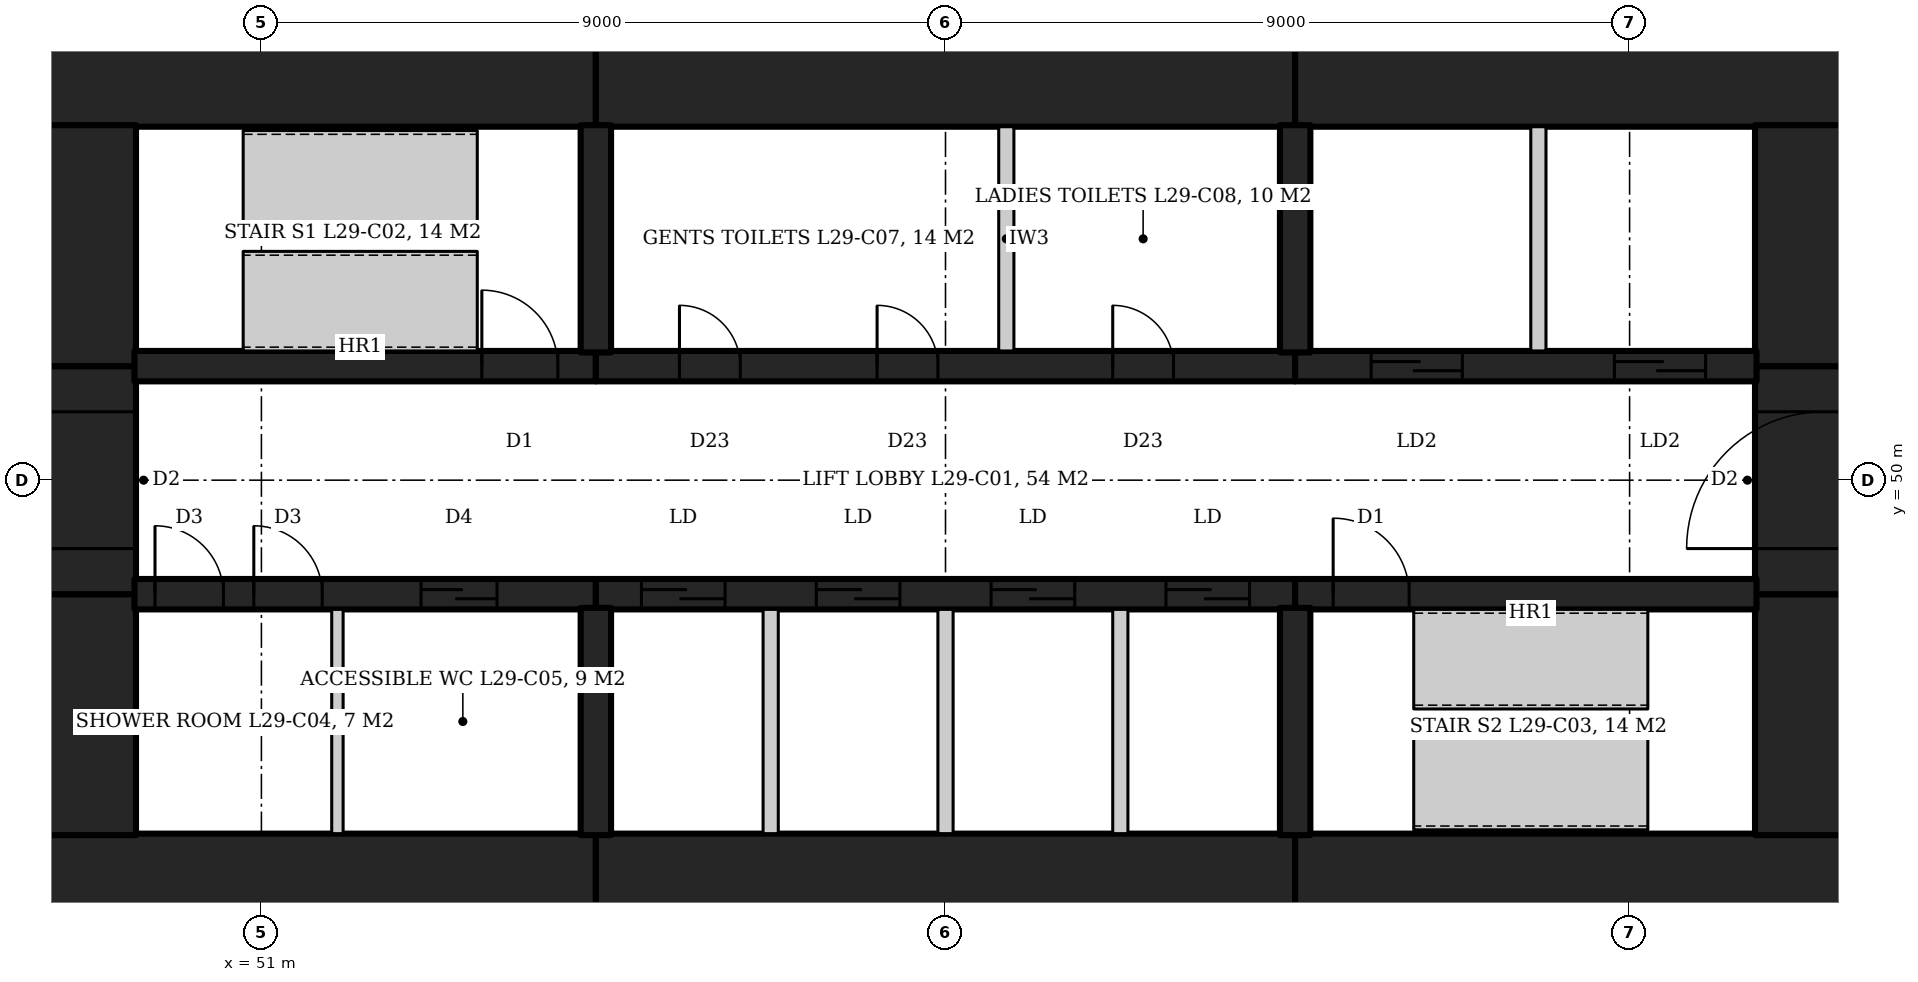
"""IFC4 building model, lengths in metres.
Left out: names, types, materials, properties, quantities, classifications, styles, units other than length and angle.
Written with IfcOpenShell. Run it as: python <this file> out.ifc"""

import sys

from ifc_helpers import new_model, si_unit, direction, frame, frame_2d, origin, place, context, subcontext, project, spatial, rectangle, extrude, element, fill, save


model = new_model("IFC4")
c1 = context("Model", 3, precision=1e-05, world=origin(), true_north=direction((0.0, 1.0)))
c2 = subcontext(c1, "Body", "Model", "MODEL_VIEW")
j1 = project(units=[si_unit("LENGTHUNIT", "METRE"), si_unit("PLANEANGLEUNIT", "RADIAN")], contexts=[c1])
p1 = place(None, origin())
s1 = spatial("IfcSite", under=j1, at=p1, CompositionType="ELEMENT")
p2 = place(p1, origin())
s2 = spatial("IfcBuilding", under=s1, at=p2, CompositionType="ELEMENT")
p3 = place(p2, frame((0.0, 0.0, 122.6)))
s3 = spatial("IfcBuildingStorey", under=s2, at=p3, CompositionType="ELEMENT", Elevation=122.6)
p4 = place(p3, frame((47.55, 55.55, 0.0), z_axis=(0.0, 0.0, 1.0), x_axis=(1.0, 0.0, 0.0)))
e1 = element("IfcWall", 1, at=p4, inside=s3, PredefinedType="SHEAR", context=c2, shape_type="SweptSolid", body=[
    extrude(rectangle(XDim=7.85, YDim=1.8, at=frame_2d((3.925, 0.0))), origin(), (0.0, 0.0, 1.0), 4.2),
])
p5 = place(p3, frame((55.4, 55.55, 0.0), z_axis=(0.0, 0.0, 1.0), x_axis=(1.0, 0.0, 0.0)))
e2 = element("IfcWall", 2, at=p5, inside=s3, PredefinedType="SHEAR", context=c2, shape_type="SweptSolid", body=[
    extrude(rectangle(XDim=9.2, YDim=1.8, at=frame_2d((4.6, 0.0))), origin(), (0.0, 0.0, 1.0), 4.2),
])
for number, where, z_axis, x_axis in (
    (3, (64.6, 55.55, 0.0), (0.0, 0.0, 1.0), (1.0, 0.0, 0.0)),
    (4, (47.55, 44.45, 0.0), (0.0, 0.0, 1.0), (1.0, 0.0, 0.0)),
):
    element("IfcWall", number, at=place(p3, frame(where, z_axis=z_axis, x_axis=x_axis)), inside=s3, PredefinedType="SHEAR", context=c2, shape_type="SweptSolid", body=[
        extrude(rectangle(XDim=7.85, YDim=1.8, at=frame_2d((3.925, 0.0))), origin(), (0.0, 0.0, 1.0), 4.2),
    ])
p6 = place(p3, frame((55.4, 44.45, 0.0), z_axis=(0.0, 0.0, 1.0), x_axis=(1.0, 0.0, 0.0)))
e5 = element("IfcWall", 5, at=p6, inside=s3, PredefinedType="SHEAR", context=c2, shape_type="SweptSolid", body=[
    extrude(rectangle(XDim=9.2, YDim=1.8, at=frame_2d((4.6, 0.0))), origin(), (0.0, 0.0, 1.0), 4.2),
])
p7 = place(p3, frame((64.6, 44.45, 0.0), z_axis=(0.0, 0.0, 1.0), x_axis=(1.0, 0.0, 0.0)))
e6 = element("IfcWall", 6, at=p7, inside=s3, PredefinedType="SHEAR", context=c2, shape_type="SweptSolid", body=[
    extrude(rectangle(XDim=7.85, YDim=1.8, at=frame_2d((3.925, 0.0))), origin(), (0.0, 0.0, 1.0), 4.2),
])
p8 = place(p3, frame((71.55, 45.33, 0.0), z_axis=(0.0, 0.0, 1.0), x_axis=(0.0, 1.0, 0.0)))
e7 = element("IfcWall", 7, at=p8, inside=s3, PredefinedType="SHEAR", context=c2, shape_type="SweptSolid", body=[
    extrude(rectangle(XDim=3.17, YDim=1.8, at=frame_2d((1.585, 0.0))), origin(), (0.0, 0.0, 1.0), 4.2),
])
p9 = place(p3, frame((71.55, 48.5, 0.0), z_axis=(0.0, 0.0, 1.0), x_axis=(0.0, 1.0, 0.0)))
e8 = element("IfcWall", 8, at=p9, inside=s3, PredefinedType="SHEAR", context=c2, shape_type="SweptSolid", body=[
    extrude(rectangle(XDim=3.0, YDim=1.8, at=frame_2d((1.5, 0.0))), origin(), (0.0, 0.0, 1.0), 4.2),
])
p10 = place(p9, frame((0.6, 0.0, 0.0)))
e9 = element("IfcOpeningElement", 9, at=p10, cuts=e8, PredefinedType="OPENING", context=c2, shape_type="SweptSolid", body=[
    extrude(rectangle(XDim=1.8, YDim=2.1, at=frame_2d((0.9, 1.05))), frame((0.0, 0.91, 0.0), z_axis=(0.0, -1.0, 0.0), x_axis=(1.0, 0.0, 0.0)), (0.0, 0.0, 1.0), 1.82),
])
for number, where, z_axis, x_axis in (
    (10, (71.55, 51.5, 0.0), (0.0, 0.0, 1.0), (0.0, 1.0, 0.0)),
    (11, (48.45, 45.33, 0.0), (0.0, 0.0, 1.0), (0.0, 1.0, 0.0)),
):
    element("IfcWall", number, at=place(p3, frame(where, z_axis=z_axis, x_axis=x_axis)), inside=s3, PredefinedType="SHEAR", context=c2, shape_type="SweptSolid", body=[
        extrude(rectangle(XDim=3.17, YDim=1.8, at=frame_2d((1.585, 0.0))), origin(), (0.0, 0.0, 1.0), 4.2),
    ])
p11 = place(p3, frame((48.45, 48.5, 0.0), z_axis=(0.0, 0.0, 1.0), x_axis=(0.0, 1.0, 0.0)))
e12 = element("IfcWall", 12, at=p11, inside=s3, PredefinedType="SHEAR", context=c2, shape_type="SweptSolid", body=[
    extrude(rectangle(XDim=3.0, YDim=1.8, at=frame_2d((1.5, 0.0))), origin(), (0.0, 0.0, 1.0), 4.2),
])
p12 = place(p11, frame((0.6, 0.0, 0.0)))
e13 = element("IfcOpeningElement", 13, at=p12, cuts=e12, PredefinedType="OPENING", context=c2, shape_type="SweptSolid", body=[
    extrude(rectangle(XDim=1.8, YDim=2.1, at=frame_2d((0.9, 1.05))), frame((0.0, 0.91, 0.0), z_axis=(0.0, -1.0, 0.0), x_axis=(1.0, 0.0, 0.0)), (0.0, 0.0, 1.0), 1.82),
])
p13 = place(p3, frame((48.45, 51.5, 0.0), z_axis=(0.0, 0.0, 1.0), x_axis=(0.0, 1.0, 0.0)))
e14 = element("IfcWall", 14, at=p13, inside=s3, PredefinedType="SHEAR", context=c2, shape_type="SweptSolid", body=[
    extrude(rectangle(XDim=3.17, YDim=1.8, at=frame_2d((1.585, 0.0))), origin(), (0.0, 0.0, 1.0), 4.2),
])
p14 = place(p3, frame((49.33, 51.5, 0.0), z_axis=(0.0, 0.0, 1.0), x_axis=(1.0, 0.0, 0.0)))
e15 = element("IfcWall", 15, at=p14, inside=s3, PredefinedType="SHEAR", context=c2, shape_type="SweptSolid", body=[
    extrude(rectangle(XDim=6.07, YDim=0.4, at=frame_2d((3.035, 0.0))), origin(), (0.0, 0.0, 1.0), 4.2),
])
p15 = place(p14, frame((4.57, 0.0, 0.0)))
e16 = element("IfcOpeningElement", 16, at=p15, cuts=e15, PredefinedType="OPENING", context=c2, shape_type="SweptSolid", body=[
    extrude(rectangle(XDim=1.0, YDim=2.1, at=frame_2d((0.5, 1.05))), frame((0.0, 0.21, 0.0), z_axis=(0.0, -1.0, 0.0), x_axis=(1.0, 0.0, 0.0)), (0.0, 0.0, 1.0), 0.42),
])
p16 = place(p3, frame((55.4, 51.5, 0.0), z_axis=(0.0, 0.0, 1.0), x_axis=(1.0, 0.0, 0.0)))
e17 = element("IfcWall", 17, at=p16, inside=s3, PredefinedType="SHEAR", context=c2, shape_type="SweptSolid", body=[
    extrude(rectangle(XDim=9.2, YDim=0.4, at=frame_2d((4.6, 0.0))), origin(), (0.0, 0.0, 1.0), 4.2),
])
p17 = place(p16, frame((1.1, 0.0, 0.0)))
e18 = element("IfcOpeningElement", 18, at=p17, cuts=e17, PredefinedType="OPENING", context=c2, shape_type="SweptSolid", body=[
    extrude(rectangle(XDim=0.8, YDim=2.1, at=frame_2d((0.4, 1.05))), frame((0.0, 0.21, 0.0), z_axis=(0.0, -1.0, 0.0), x_axis=(1.0, 0.0, 0.0)), (0.0, 0.0, 1.0), 0.42),
])
p18 = place(p16, frame((3.7, 0.0, 0.0)))
e19 = element("IfcOpeningElement", 19, at=p18, cuts=e17, PredefinedType="OPENING", context=c2, shape_type="SweptSolid", body=[
    extrude(rectangle(XDim=0.8, YDim=2.1, at=frame_2d((0.4, 1.05))), frame((0.0, 0.21, 0.0), z_axis=(0.0, -1.0, 0.0), x_axis=(1.0, 0.0, 0.0)), (0.0, 0.0, 1.0), 0.42),
])
p19 = place(p16, frame((6.8, 0.0, 0.0)))
e20 = element("IfcOpeningElement", 20, at=p19, cuts=e17, PredefinedType="OPENING", context=c2, shape_type="SweptSolid", body=[
    extrude(rectangle(XDim=0.8, YDim=2.1, at=frame_2d((0.4, 1.05))), frame((0.0, 0.21, 0.0), z_axis=(0.0, -1.0, 0.0), x_axis=(1.0, 0.0, 0.0)), (0.0, 0.0, 1.0), 0.42),
])
p20 = place(p3, frame((64.6, 51.5, 0.0), z_axis=(0.0, 0.0, 1.0), x_axis=(1.0, 0.0, 0.0)))
e21 = element("IfcWall", 21, at=p20, inside=s3, PredefinedType="SHEAR", context=c2, shape_type="SweptSolid", body=[
    extrude(rectangle(XDim=6.07, YDim=0.4, at=frame_2d((3.035, 0.0))), origin(), (0.0, 0.0, 1.0), 4.2),
])
p21 = place(p20, frame((1.0, 0.0, 0.0)))
e22 = element("IfcOpeningElement", 22, at=p21, cuts=e21, PredefinedType="OPENING", context=c2, shape_type="SweptSolid", body=[
    extrude(rectangle(XDim=1.2, YDim=2.1, at=frame_2d((0.6, 1.05))), frame((0.0, 0.21, 0.0), z_axis=(0.0, -1.0, 0.0), x_axis=(1.0, 0.0, 0.0)), (0.0, 0.0, 1.0), 0.42),
])
p22 = place(p20, frame((4.2, 0.0, 0.0)))
e23 = element("IfcOpeningElement", 23, at=p22, cuts=e21, PredefinedType="OPENING", context=c2, shape_type="SweptSolid", body=[
    extrude(rectangle(XDim=1.2, YDim=2.1, at=frame_2d((0.6, 1.05))), frame((0.0, 0.21, 0.0), z_axis=(0.0, -1.0, 0.0), x_axis=(1.0, 0.0, 0.0)), (0.0, 0.0, 1.0), 0.42),
])
p23 = place(p3, frame((49.33, 48.5, 0.0), z_axis=(0.0, 0.0, 1.0), x_axis=(1.0, 0.0, 0.0)))
e24 = element("IfcWall", 24, at=p23, inside=s3, PredefinedType="SHEAR", context=c2, shape_type="SweptSolid", body=[
    extrude(rectangle(XDim=6.07, YDim=0.4, at=frame_2d((3.035, 0.0))), origin(), (0.0, 0.0, 1.0), 4.2),
])
p24 = place(p23, frame((0.27, 0.0, 0.0)))
e25 = element("IfcOpeningElement", 25, at=p24, cuts=e24, PredefinedType="OPENING", context=c2, shape_type="SweptSolid", body=[
    extrude(rectangle(XDim=0.9, YDim=2.1, at=frame_2d((0.45, 1.05))), frame((0.0, 0.21, 0.0), z_axis=(0.0, -1.0, 0.0), x_axis=(1.0, 0.0, 0.0)), (0.0, 0.0, 1.0), 0.42),
])
p25 = place(p23, frame((1.57, 0.0, 0.0)))
e26 = element("IfcOpeningElement", 26, at=p25, cuts=e24, PredefinedType="OPENING", context=c2, shape_type="SweptSolid", body=[
    extrude(rectangle(XDim=0.9, YDim=2.1, at=frame_2d((0.45, 1.05))), frame((0.0, 0.21, 0.0), z_axis=(0.0, -1.0, 0.0), x_axis=(1.0, 0.0, 0.0)), (0.0, 0.0, 1.0), 0.42),
])
p26 = place(p23, frame((3.77, 0.0, 0.0)))
e27 = element("IfcOpeningElement", 27, at=p26, cuts=e24, PredefinedType="OPENING", context=c2, shape_type="SweptSolid", body=[
    extrude(rectangle(XDim=1.0, YDim=2.1, at=frame_2d((0.5, 1.05))), frame((0.0, 0.21, 0.0), z_axis=(0.0, -1.0, 0.0), x_axis=(1.0, 0.0, 0.0)), (0.0, 0.0, 1.0), 0.42),
])
p27 = place(p3, frame((55.4, 48.5, 0.0), z_axis=(0.0, 0.0, 1.0), x_axis=(1.0, 0.0, 0.0)))
e28 = element("IfcWall", 28, at=p27, inside=s3, PredefinedType="SHEAR", context=c2, shape_type="SweptSolid", body=[
    extrude(rectangle(XDim=9.2, YDim=0.4, at=frame_2d((4.6, 0.0))), origin(), (0.0, 0.0, 1.0), 4.2),
])
p28 = place(p27, frame((0.6, 0.0, 0.0)))
e29 = element("IfcOpeningElement", 29, at=p28, cuts=e28, PredefinedType="OPENING", context=c2, shape_type="SweptSolid", body=[
    extrude(rectangle(XDim=1.1, YDim=2.1, at=frame_2d((0.55, 1.05))), frame((0.0, 0.21, 0.0), z_axis=(0.0, -1.0, 0.0), x_axis=(1.0, 0.0, 0.0)), (0.0, 0.0, 1.0), 0.42),
])
p29 = place(p27, frame((2.9, 0.0, 0.0)))
e30 = element("IfcOpeningElement", 30, at=p29, cuts=e28, PredefinedType="OPENING", context=c2, shape_type="SweptSolid", body=[
    extrude(rectangle(XDim=1.1, YDim=2.1, at=frame_2d((0.55, 1.05))), frame((0.0, 0.21, 0.0), z_axis=(0.0, -1.0, 0.0), x_axis=(1.0, 0.0, 0.0)), (0.0, 0.0, 1.0), 0.42),
])
p30 = place(p27, frame((5.2, 0.0, 0.0)))
e31 = element("IfcOpeningElement", 31, at=p30, cuts=e28, PredefinedType="OPENING", context=c2, shape_type="SweptSolid", body=[
    extrude(rectangle(XDim=1.1, YDim=2.1, at=frame_2d((0.55, 1.05))), frame((0.0, 0.21, 0.0), z_axis=(0.0, -1.0, 0.0), x_axis=(1.0, 0.0, 0.0)), (0.0, 0.0, 1.0), 0.42),
])
p31 = place(p27, frame((7.5, 0.0, 0.0)))
e32 = element("IfcOpeningElement", 32, at=p31, cuts=e28, PredefinedType="OPENING", context=c2, shape_type="SweptSolid", body=[
    extrude(rectangle(XDim=1.1, YDim=2.1, at=frame_2d((0.55, 1.05))), frame((0.0, 0.21, 0.0), z_axis=(0.0, -1.0, 0.0), x_axis=(1.0, 0.0, 0.0)), (0.0, 0.0, 1.0), 0.42),
])
p32 = place(p3, frame((64.6, 48.5, 0.0), z_axis=(0.0, 0.0, 1.0), x_axis=(1.0, 0.0, 0.0)))
e33 = element("IfcWall", 33, at=p32, inside=s3, PredefinedType="SHEAR", context=c2, shape_type="SweptSolid", body=[
    extrude(rectangle(XDim=6.07, YDim=0.4, at=frame_2d((3.035, 0.0))), origin(), (0.0, 0.0, 1.0), 4.2),
])
p33 = place(p32, frame((0.5, 0.0, 0.0)))
e34 = element("IfcOpeningElement", 34, at=p33, cuts=e33, PredefinedType="OPENING", context=c2, shape_type="SweptSolid", body=[
    extrude(rectangle(XDim=1.0, YDim=2.1, at=frame_2d((0.5, 1.05))), frame((0.0, 0.21, 0.0), z_axis=(0.0, -1.0, 0.0), x_axis=(1.0, 0.0, 0.0)), (0.0, 0.0, 1.0), 0.42),
])
for number, where, z_axis, x_axis in (
    (35, (55.4, 51.68, 0.0), (0.0, 0.0, 1.0), (0.0, 1.0, 0.0)),
    (36, (64.6, 51.68, 0.0), (0.0, 0.0, 1.0), (0.0, 1.0, 0.0)),
    (37, (55.4, 48.32, 0.0), (0.0, 0.0, 1.0), (0.0, -1.0, 0.0)),
    (38, (64.6, 48.32, 0.0), (0.0, 0.0, 1.0), (0.0, -1.0, 0.0)),
):
    element("IfcWall", number, at=place(p3, frame(where, z_axis=z_axis, x_axis=x_axis)), inside=s3, PredefinedType="SHEAR", context=c2, shape_type="SweptSolid", body=[
        extrude(rectangle(XDim=2.99, YDim=0.4, at=frame_2d((1.495, 0.0))), origin(), (0.0, 0.0, 1.0), 4.2),
    ])
for number, where, z_axis, x_axis in (
    (39, (57.7, 45.35, 0.0), (0.0, 0.0, 1.0), (0.0, 1.0, 0.0)),
    (40, (60.0, 45.35, 0.0), (0.0, 0.0, 1.0), (0.0, 1.0, 0.0)),
    (41, (62.3, 45.35, 0.0), (0.0, 0.0, 1.0), (0.0, 1.0, 0.0)),
    (42, (67.8, 51.7, 0.0), (0.0, 0.0, 1.0), (0.0, 1.0, 0.0)),
):
    element("IfcWall", number, at=place(p3, frame(where, z_axis=z_axis, x_axis=x_axis)), inside=s3, PredefinedType="PARTITIONING", context=c2, shape_type="SweptSolid", body=[
        extrude(rectangle(XDim=2.95, YDim=0.2, at=frame_2d((1.475, 0.0))), origin(), (0.0, 0.0, 1.0), 4.2),
    ])
p34 = place(p3, frame((52.0, 45.35, 0.0), z_axis=(0.0, 0.0, 1.0), x_axis=(0.0, 1.0, 0.0)))
e43 = element("IfcWall", 43, at=p34, inside=s3, PredefinedType="PARTITIONING", context=c2, shape_type="SweptSolid", body=[
    extrude(rectangle(XDim=2.95, YDim=0.15, at=frame_2d((1.475, 0.0))), origin(), (0.0, 0.0, 1.0), 4.04),
])
p35 = place(p3, frame((60.8, 51.7, 0.0), z_axis=(0.0, 0.0, 1.0), x_axis=(0.0, 1.0, 0.0)))
e44 = element("IfcWall", 44, at=p35, inside=s3, PredefinedType="PARTITIONING", context=c2, shape_type="SweptSolid", body=[
    extrude(rectangle(XDim=2.95, YDim=0.2, at=frame_2d((1.475, 0.0))), origin(), (0.0, 0.0, 1.0), 4.04),
])
p36 = place(p15, origin())
e45 = element("IfcDoor", 45, at=p36, inside=s3, OperationType="SINGLE_SWING_LEFT", PredefinedType="DOOR", context=c2, shape_type="SweptSolid", body=[
    extrude(rectangle(XDim=1.0, YDim=2.1, at=frame_2d((0.5, 1.05))), frame((0.0, 0.025, 0.0), z_axis=(0.0, -1.0, 0.0), x_axis=(1.0, 0.0, 0.0)), (0.0, 0.0, 1.0), 0.05),
])
fill(e16, e45)
p37 = place(p33, origin())
e46 = element("IfcDoor", 46, at=p37, inside=s3, OperationType="SINGLE_SWING_LEFT", PredefinedType="DOOR", context=c2, shape_type="SweptSolid", body=[
    extrude(rectangle(XDim=1.0, YDim=2.1, at=frame_2d((0.5, 1.05))), frame((0.0, 0.025, 0.0), z_axis=(0.0, -1.0, 0.0), x_axis=(1.0, 0.0, 0.0)), (0.0, 0.0, 1.0), 0.05),
])
fill(e34, e46)
p38 = place(p21, origin())
e47 = element("IfcDoor", 47, at=p38, inside=s3, OperationType="SLIDING_TO_LEFT", PredefinedType="DOOR", context=c2, shape_type="SweptSolid", body=[
    extrude(rectangle(XDim=1.2, YDim=2.1, at=frame_2d((0.6, 1.05))), frame((0.0, 0.025, 0.0), z_axis=(0.0, -1.0, 0.0), x_axis=(1.0, 0.0, 0.0)), (0.0, 0.0, 1.0), 0.05),
])
fill(e22, e47)
p39 = place(p22, origin())
e48 = element("IfcDoor", 48, at=p39, inside=s3, OperationType="SLIDING_TO_LEFT", PredefinedType="DOOR", context=c2, shape_type="SweptSolid", body=[
    extrude(rectangle(XDim=1.2, YDim=2.1, at=frame_2d((0.6, 1.05))), frame((0.0, 0.025, 0.0), z_axis=(0.0, -1.0, 0.0), x_axis=(1.0, 0.0, 0.0)), (0.0, 0.0, 1.0), 0.05),
])
fill(e23, e48)
p40 = place(p28, origin())
e49 = element("IfcDoor", 49, at=p40, inside=s3, OperationType="SLIDING_TO_LEFT", PredefinedType="DOOR", context=c2, shape_type="SweptSolid", body=[
    extrude(rectangle(XDim=1.1, YDim=2.1, at=frame_2d((0.55, 1.05))), frame((0.0, 0.025, 0.0), z_axis=(0.0, -1.0, 0.0), x_axis=(1.0, 0.0, 0.0)), (0.0, 0.0, 1.0), 0.05),
])
fill(e29, e49)
p41 = place(p29, origin())
e50 = element("IfcDoor", 50, at=p41, inside=s3, OperationType="SLIDING_TO_LEFT", PredefinedType="DOOR", context=c2, shape_type="SweptSolid", body=[
    extrude(rectangle(XDim=1.1, YDim=2.1, at=frame_2d((0.55, 1.05))), frame((0.0, 0.025, 0.0), z_axis=(0.0, -1.0, 0.0), x_axis=(1.0, 0.0, 0.0)), (0.0, 0.0, 1.0), 0.05),
])
fill(e30, e50)
p42 = place(p30, origin())
e51 = element("IfcDoor", 51, at=p42, inside=s3, OperationType="SLIDING_TO_LEFT", PredefinedType="DOOR", context=c2, shape_type="SweptSolid", body=[
    extrude(rectangle(XDim=1.1, YDim=2.1, at=frame_2d((0.55, 1.05))), frame((0.0, 0.025, 0.0), z_axis=(0.0, -1.0, 0.0), x_axis=(1.0, 0.0, 0.0)), (0.0, 0.0, 1.0), 0.05),
])
fill(e31, e51)
p43 = place(p31, origin())
e52 = element("IfcDoor", 52, at=p43, inside=s3, OperationType="SLIDING_TO_LEFT", PredefinedType="DOOR", context=c2, shape_type="SweptSolid", body=[
    extrude(rectangle(XDim=1.1, YDim=2.1, at=frame_2d((0.55, 1.05))), frame((0.0, 0.025, 0.0), z_axis=(0.0, -1.0, 0.0), x_axis=(1.0, 0.0, 0.0)), (0.0, 0.0, 1.0), 0.05),
])
fill(e32, e52)
p44 = place(p24, origin())
e53 = element("IfcDoor", 53, at=p44, inside=s3, OperationType="SINGLE_SWING_RIGHT", PredefinedType="DOOR", context=c2, shape_type="SweptSolid", body=[
    extrude(rectangle(XDim=0.9, YDim=2.1, at=frame_2d((0.45, 1.05))), frame((0.0, 0.025, 0.0), z_axis=(0.0, -1.0, 0.0), x_axis=(1.0, 0.0, 0.0)), (0.0, 0.0, 1.0), 0.05),
])
fill(e25, e53)
p45 = place(p25, origin())
e54 = element("IfcDoor", 54, at=p45, inside=s3, OperationType="SINGLE_SWING_RIGHT", PredefinedType="DOOR", context=c2, shape_type="SweptSolid", body=[
    extrude(rectangle(XDim=0.9, YDim=2.1, at=frame_2d((0.45, 1.05))), frame((0.0, 0.025, 0.0), z_axis=(0.0, -1.0, 0.0), x_axis=(1.0, 0.0, 0.0)), (0.0, 0.0, 1.0), 0.05),
])
fill(e26, e54)
p46 = place(p26, origin())
e55 = element("IfcDoor", 55, at=p46, inside=s3, OperationType="SLIDING_TO_LEFT", PredefinedType="DOOR", context=c2, shape_type="SweptSolid", body=[
    extrude(rectangle(XDim=1.0, YDim=2.1, at=frame_2d((0.5, 1.05))), frame((0.0, 0.025, 0.0), z_axis=(0.0, -1.0, 0.0), x_axis=(1.0, 0.0, 0.0)), (0.0, 0.0, 1.0), 0.05),
])
fill(e27, e55)
p47 = place(p10, origin())
e56 = element("IfcDoor", 56, at=p47, inside=s3, OperationType="DOUBLE_DOOR_DOUBLE_SWING", PredefinedType="DOOR", context=c2, shape_type="SweptSolid", body=[
    extrude(rectangle(XDim=1.8, YDim=2.1, at=frame_2d((0.9, 1.05))), frame((0.0, 0.025, 0.0), z_axis=(0.0, -1.0, 0.0), x_axis=(1.0, 0.0, 0.0)), (0.0, 0.0, 1.0), 0.05),
])
fill(e9, e56)
p48 = place(p12, origin())
e57 = element("IfcDoor", 57, at=p48, inside=s3, OperationType="DOUBLE_DOOR_DOUBLE_SWING", PredefinedType="DOOR", context=c2, shape_type="SweptSolid", body=[
    extrude(rectangle(XDim=1.8, YDim=2.1, at=frame_2d((0.9, 1.05))), frame((0.0, 0.025, 0.0), z_axis=(0.0, -1.0, 0.0), x_axis=(1.0, 0.0, 0.0)), (0.0, 0.0, 1.0), 0.05),
])
fill(e13, e57)
p49 = place(p17, origin())
e58 = element("IfcDoor", 58, at=p49, inside=s3, OperationType="SINGLE_SWING_LEFT", PredefinedType="DOOR", context=c2, shape_type="SweptSolid", body=[
    extrude(rectangle(XDim=0.8, YDim=2.1, at=frame_2d((0.4, 1.05))), frame((0.0, 0.025, 0.0), z_axis=(0.0, -1.0, 0.0), x_axis=(1.0, 0.0, 0.0)), (0.0, 0.0, 1.0), 0.05),
])
fill(e18, e58)
p50 = place(p18, origin())
e59 = element("IfcDoor", 59, at=p50, inside=s3, OperationType="SINGLE_SWING_LEFT", PredefinedType="DOOR", context=c2, shape_type="SweptSolid", body=[
    extrude(rectangle(XDim=0.8, YDim=2.1, at=frame_2d((0.4, 1.05))), frame((0.0, 0.025, 0.0), z_axis=(0.0, -1.0, 0.0), x_axis=(1.0, 0.0, 0.0)), (0.0, 0.0, 1.0), 0.05),
])
fill(e19, e59)
p51 = place(p19, origin())
e60 = element("IfcDoor", 60, at=p51, inside=s3, OperationType="SINGLE_SWING_LEFT", PredefinedType="DOOR", context=c2, shape_type="SweptSolid", body=[
    extrude(rectangle(XDim=0.8, YDim=2.1, at=frame_2d((0.4, 1.05))), frame((0.0, 0.025, 0.0), z_axis=(0.0, -1.0, 0.0), x_axis=(1.0, 0.0, 0.0)), (0.0, 0.0, 1.0), 0.05),
])
fill(e20, e60)
save(model, sys.argv[1])
